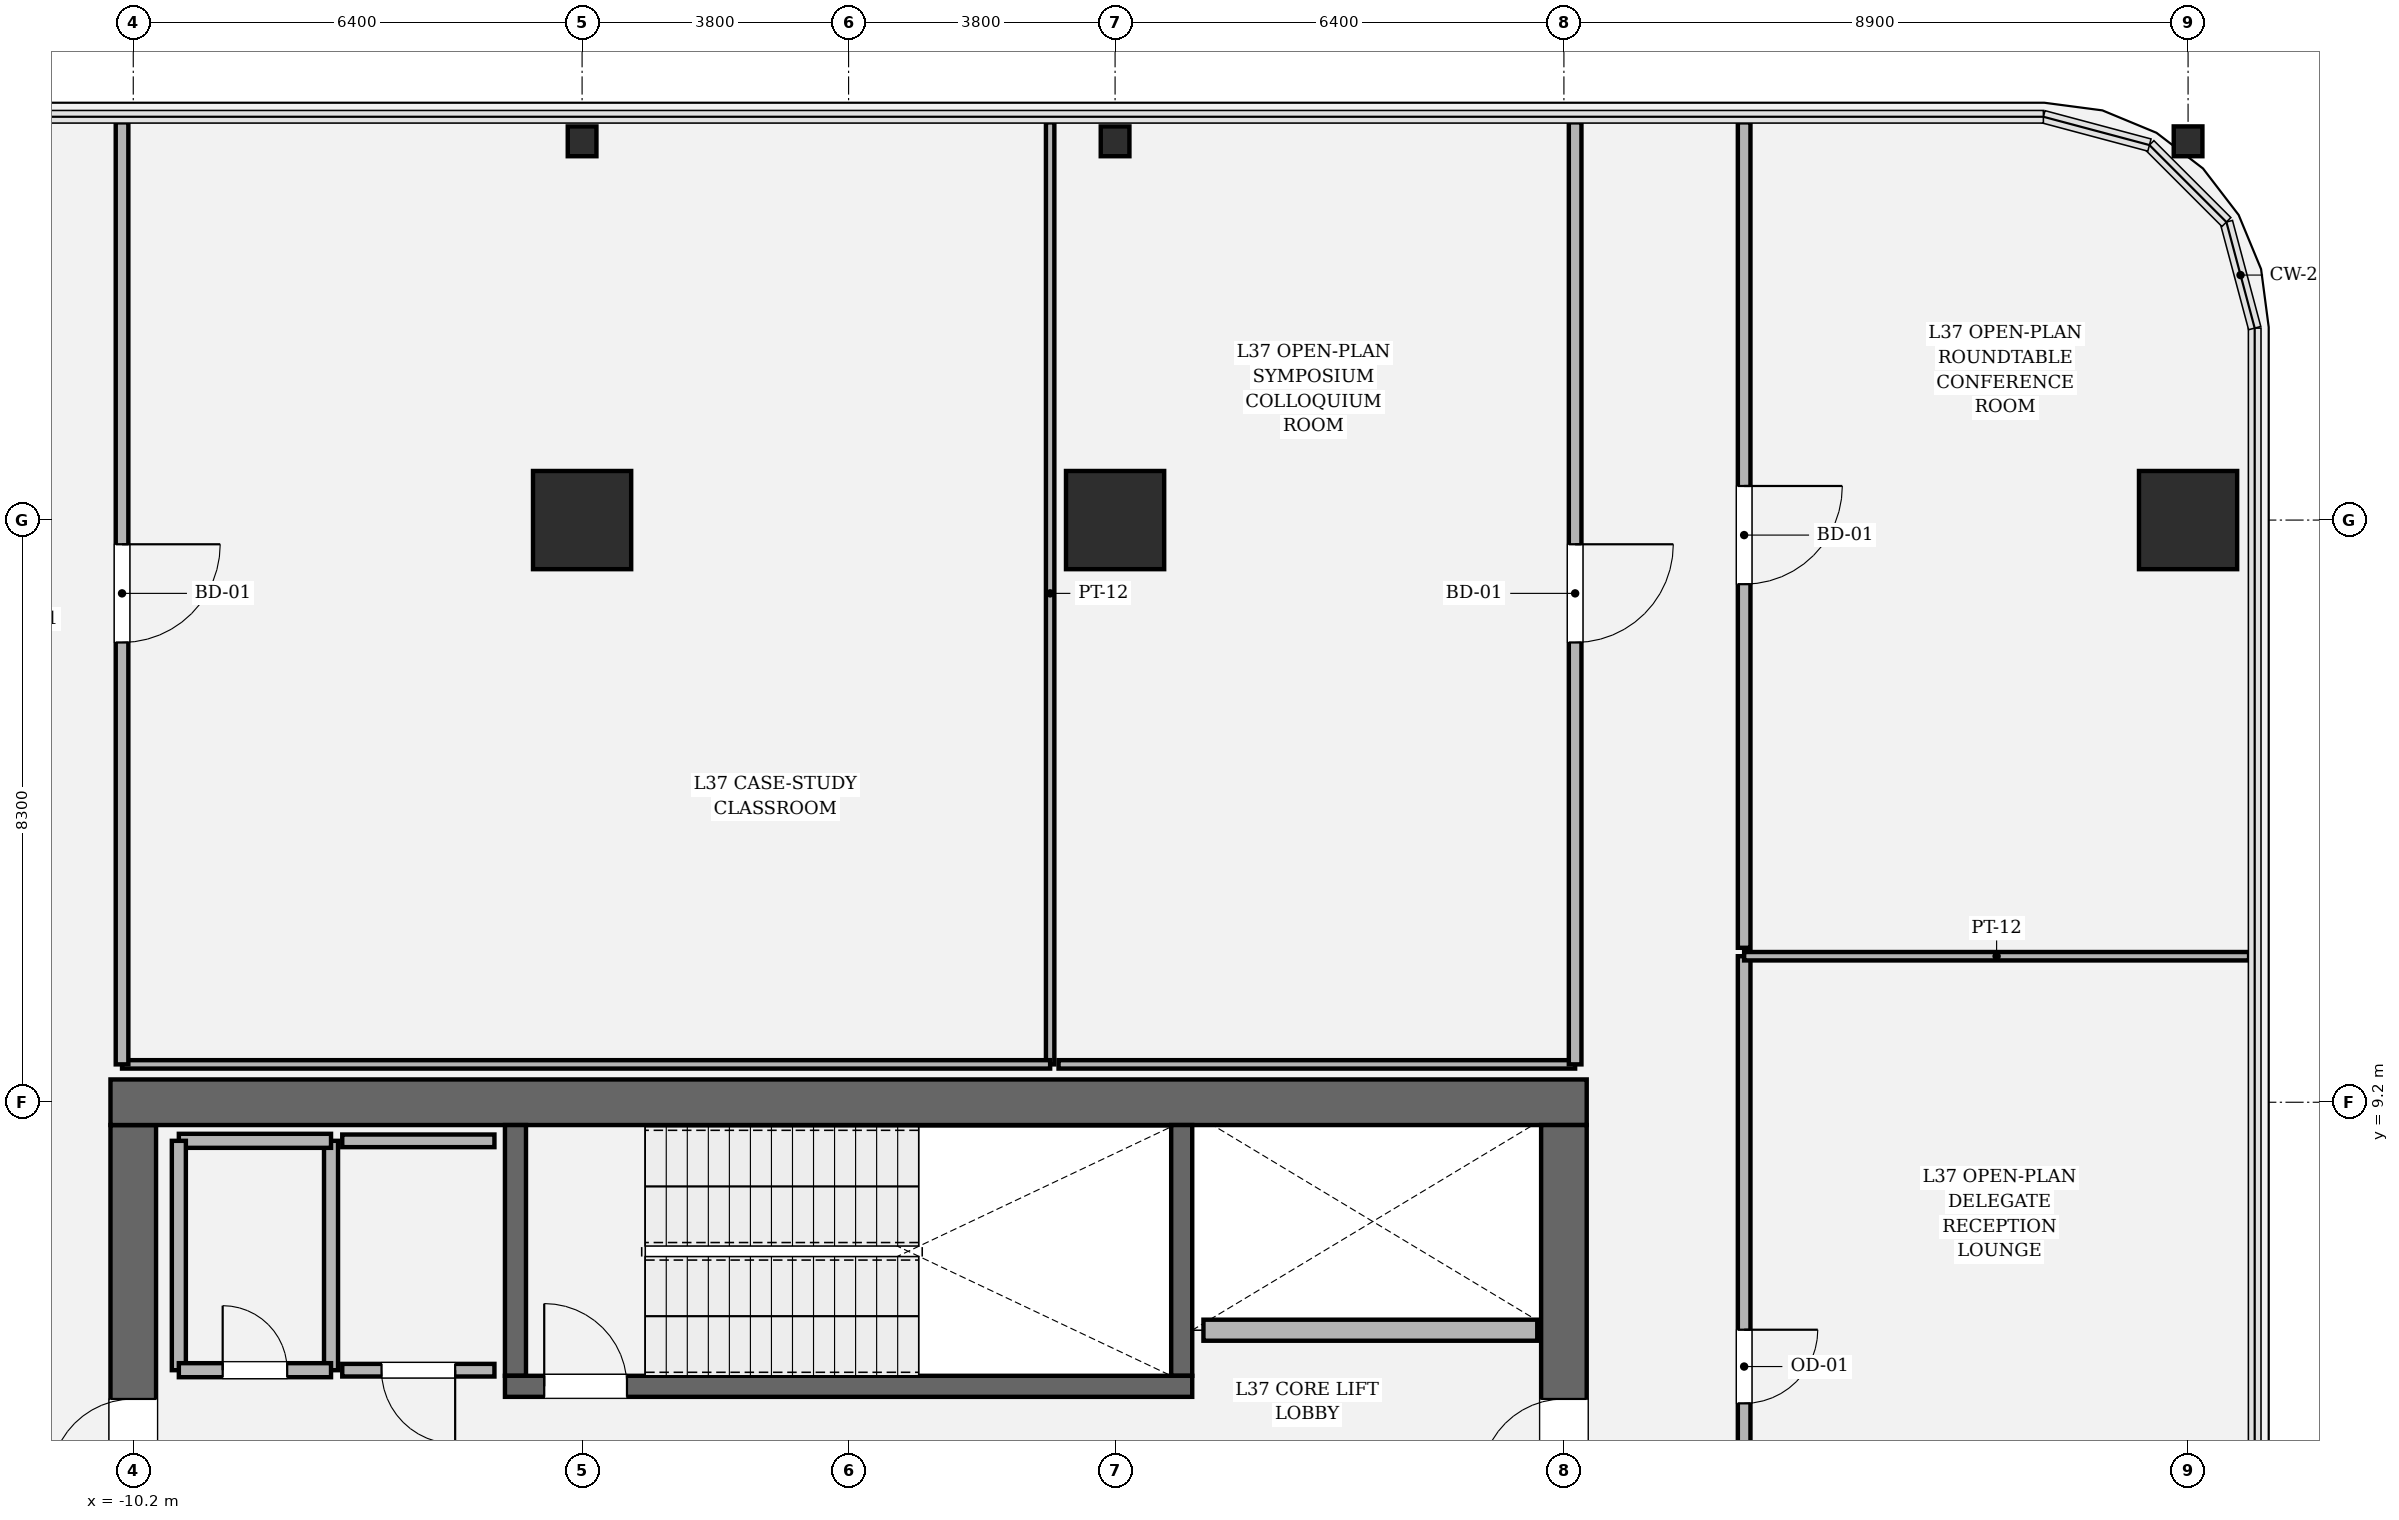
"""IFC4 building model, lengths in metres.
Left out: names, types, materials, properties, quantities, classifications, styles, units other than length and angle.
Written with IfcOpenShell. Run it as: python <this file> out.ifc"""

import sys

from ifc_helpers import new_model, si_unit, direction, frame, frame_2d, origin, origin_2d, place, context, subcontext, project, spatial, rectangle, hollow_rectangle, i_section, extrude, element, fill, save


model = new_model("IFC4")
c1 = context("Model", 3, precision=1e-05, world=origin(), true_north=direction((0.0, 1.0)))
c2 = subcontext(c1, "Body", "Model", "MODEL_VIEW")
j1 = project(units=[si_unit("LENGTHUNIT", "METRE"), si_unit("PLANEANGLEUNIT", "RADIAN")], contexts=[c1])
p1 = place(None, origin())
s1 = spatial("IfcSite", under=j1, at=p1, CompositionType="ELEMENT")
p2 = place(p1, origin())
s2 = spatial("IfcBuilding", under=s1, at=p2, CompositionType="ELEMENT")
p3 = place(p2, frame((0.0, 0.0, 160.05)))
s3 = spatial("IfcBuildingStorey", under=s2, at=p3, CompositionType="ELEMENT", Elevation=160.05)
p4 = place(p3, frame((-10.2, -8.875, 0.0), z_axis=(0.0, 0.0, 1.0), x_axis=(0.0, 1.0, 0.0)))
e1 = element("IfcWall", 1, at=p4, inside=s3, PredefinedType="SHEAR", context=c2, shape_type="SweptSolid", body=[
    extrude(rectangle(XDim=17.75, YDim=0.65, at=frame_2d((8.875, 0.0))), origin(), (0.0, 0.0, 1.0), 4.05),
])
p5 = place(p4, frame((12.665, 0.0, 0.0)))
e2 = element("IfcOpeningElement", 2, at=p5, cuts=e1, PredefinedType="OPENING", context=c2, shape_type="SweptSolid", body=[
    extrude(rectangle(XDim=1.18, YDim=2.2, at=frame_2d((0.59, 1.1))), frame((0.0, 0.335, 0.0), z_axis=(0.0, -1.0, 0.0), x_axis=(1.0, 0.0, 0.0)), (0.0, 0.0, 1.0), 0.67),
])
p6 = place(p3, frame((-10.525, 9.2, 0.0), z_axis=(0.0, 0.0, 1.0), x_axis=(1.0, 0.0, 0.0)))
e3 = element("IfcWall", 3, at=p6, inside=s3, PredefinedType="SHEAR", context=c2, shape_type="SweptSolid", body=[
    extrude(rectangle(XDim=21.05, YDim=0.65, at=frame_2d((10.525, 0.0))), origin(), (0.0, 0.0, 1.0), 4.05),
])
p7 = place(p3, frame((10.2, 8.875, 0.0), z_axis=(0.0, 0.0, 1.0), x_axis=(0.0, -1.0, 0.0)))
e4 = element("IfcWall", 4, at=p7, inside=s3, PredefinedType="SHEAR", context=c2, shape_type="SweptSolid", body=[
    extrude(rectangle(XDim=17.75, YDim=0.65, at=frame_2d((8.875, 0.0))), origin(), (0.0, 0.0, 1.0), 4.05),
])
p8 = place(p7, frame((3.905, 0.0, 0.0)))
e5 = element("IfcOpeningElement", 5, at=p8, cuts=e4, PredefinedType="OPENING", context=c2, shape_type="SweptSolid", body=[
    extrude(rectangle(XDim=1.18, YDim=2.2, at=frame_2d((0.59, 1.1))), frame((0.0, 0.335, 0.0), z_axis=(0.0, -1.0, 0.0), x_axis=(1.0, 0.0, 0.0)), (0.0, 0.0, 1.0), 0.67),
])
for number, where, z_axis, x_axis in (
    (6, (-4.75, 5.3, 0.0), (0.0, 0.0, 1.0), (0.0, 1.0, 0.0)),
    (7, (4.75, 8.875, 0.0), (0.0, 0.0, 1.0), (0.0, -1.0, 0.0)),
):
    element("IfcWall", number, at=place(p3, frame(where, z_axis=z_axis, x_axis=x_axis)), inside=s3, PredefinedType="SOLIDWALL", context=c2, shape_type="SweptSolid", body=[
        extrude(rectangle(XDim=3.575, YDim=0.3, at=frame_2d((1.788, 0.0))), origin(), (0.0, 0.0, 1.0), 4.05),
    ])
p9 = place(p3, frame((-4.9, 5.15, 0.0), z_axis=(0.0, 0.0, 1.0), x_axis=(1.0, 0.0, 0.0)))
e8 = element("IfcWall", 8, at=p9, inside=s3, PredefinedType="SOLIDWALL", context=c2, shape_type="SweptSolid", body=[
    extrude(rectangle(XDim=9.8, YDim=0.3, at=frame_2d((4.9, 0.0))), origin(), (0.0, 0.0, 1.0), 4.05),
])
p10 = place(p9, frame((0.56, 0.0, 0.0)))
e9 = element("IfcOpeningElement", 9, at=p10, cuts=e8, PredefinedType="OPENING", context=c2, shape_type="SweptSolid", body=[
    extrude(rectangle(XDim=1.18, YDim=2.2, at=frame_2d((0.59, 1.1))), frame((0.0, 0.16, 0.0), z_axis=(0.0, -1.0, 0.0), x_axis=(1.0, 0.0, 0.0)), (0.0, 0.0, 1.0), 0.32),
])
for number, where, z_axis, x_axis in (
    (10, (19.1, 17.5, 0.0), (0.0, 0.0, 1.0), (1.0, 0.0, 0.0)),
    (11, (3.8, 17.5, 0.0), (0.0, 0.0, 1.0), (1.0, 0.0, 0.0)),
    (12, (-3.8, 17.5, 0.0), (0.0, 0.0, 1.0), (1.0, 0.0, 0.0)),
):
    element("IfcColumn", number, at=place(p3, frame(where, z_axis=z_axis, x_axis=x_axis)), inside=s3, PredefinedType="COLUMN", context=c2, shape_type="SweptSolid", body=[
        extrude(hollow_rectangle(XDim=1.4, YDim=1.4, WallThickness=0.042, at=origin_2d()), origin(), (0.0, 0.0, 1.0), 4.05),
    ])
for number, where, z_axis, x_axis in (
    (13, (-3.8, 22.9, 0.0), (0.0, 0.0, 1.0), (1.0, 0.0, 0.0)),
    (14, (3.8, 22.9, 0.0), (0.0, 0.0, 1.0), (1.0, 0.0, 0.0)),
    (15, (19.1, 22.9, 0.0), (0.0, 0.0, 1.0), (1.0, 0.0, 0.0)),
):
    element("IfcColumn", number, at=place(p3, frame(where, z_axis=z_axis, x_axis=x_axis)), inside=s3, PredefinedType="COLUMN", context=c2, shape_type="SweptSolid", body=[
        extrude(i_section(OverallWidth=0.409, OverallDepth=0.425, WebThickness=0.032, FlangeThickness=0.052, FilletRadius=0.018, at=origin_2d()), origin(), (0.0, 0.0, 1.0), 4.048),
    ])
p11 = place(p3, frame((5.06, 5.95, 0.0), z_axis=(0.0, 0.0, 1.0), x_axis=(1.0, 0.0, 0.0)))
e16 = element("IfcWall", 16, at=p11, inside=s3, PredefinedType="SOLIDWALL", context=c2, shape_type="SweptSolid", body=[
    extrude(rectangle(XDim=4.76, YDim=0.3, at=frame_2d((2.38, 0.0))), origin(), (0.0, 0.0, 1.0), 3.83),
])
p12 = place(p3, frame((-7.38, 5.38, 0.0), z_axis=(0.0, 0.0, 1.0), x_axis=(0.0, 1.0, 0.0)))
e17 = element("IfcWall", 17, at=p12, inside=s3, PredefinedType="SOLIDWALL", context=c2, shape_type="SweptSolid", body=[
    extrude(rectangle(XDim=3.27, YDim=0.2, at=frame_2d((1.635, 0.0))), origin(), (0.0, 0.0, 1.0), 3.83),
])
p13 = place(p3, frame((-7.38, 8.65, 0.0), z_axis=(0.0, 0.0, 1.0), x_axis=(-1.0, 0.0, 0.0)))
e18 = element("IfcWall", 18, at=p13, inside=s3, PredefinedType="SOLIDWALL", context=c2, shape_type="SweptSolid", body=[
    extrude(rectangle(XDim=2.17, YDim=0.2, at=frame_2d((1.085, 0.0))), origin(), (0.0, 0.0, 1.0), 3.83),
])
p14 = place(p3, frame((-9.55, 8.65, 0.0), z_axis=(0.0, 0.0, 1.0), x_axis=(0.0, -1.0, 0.0)))
e19 = element("IfcWall", 19, at=p14, inside=s3, PredefinedType="SOLIDWALL", context=c2, shape_type="SweptSolid", body=[
    extrude(rectangle(XDim=3.27, YDim=0.2, at=frame_2d((1.635, 0.0))), origin(), (0.0, 0.0, 1.0), 3.83),
])
p15 = place(p3, frame((-9.55, 5.38, 0.0), z_axis=(0.0, 0.0, 1.0), x_axis=(1.0, 0.0, 0.0)))
e20 = element("IfcWall", 20, at=p15, inside=s3, PredefinedType="SOLIDWALL", context=c2, shape_type="SweptSolid", body=[
    extrude(rectangle(XDim=2.17, YDim=0.2, at=frame_2d((1.085, 0.0))), origin(), (0.0, 0.0, 1.0), 3.83),
])
p16 = place(p15, frame((0.625, 0.0, 0.0)))
e21 = element("IfcOpeningElement", 21, at=p16, cuts=e20, PredefinedType="OPENING", context=c2, shape_type="SweptSolid", body=[
    extrude(rectangle(XDim=0.92, YDim=2.1, at=frame_2d((0.46, 1.05))), frame((0.0, 0.11, 0.0), z_axis=(0.0, -1.0, 0.0), x_axis=(1.0, 0.0, 0.0)), (0.0, 0.0, 1.0), 0.22),
])
p17 = place(p3, frame((-5.05, 8.65, 0.0), z_axis=(0.0, 0.0, 1.0), x_axis=(-1.0, 0.0, 0.0)))
e22 = element("IfcWall", 22, at=p17, inside=s3, PredefinedType="PARTITIONING", context=c2, shape_type="SweptSolid", body=[
    extrude(rectangle(XDim=2.17, YDim=0.18, at=frame_2d((1.085, 0.0))), origin(), (0.0, 0.0, 1.0), 3.83),
])
p18 = place(p3, frame((-7.22, 5.38, 0.0), z_axis=(0.0, 0.0, 1.0), x_axis=(1.0, 0.0, 0.0)))
e23 = element("IfcWall", 23, at=p18, inside=s3, PredefinedType="PARTITIONING", context=c2, shape_type="SweptSolid", body=[
    extrude(rectangle(XDim=2.17, YDim=0.18, at=frame_2d((1.085, 0.0))), origin(), (0.0, 0.0, 1.0), 3.83),
])
p19 = place(p18, frame((0.56, 0.0, 0.0)))
e24 = element("IfcOpeningElement", 24, at=p19, cuts=e23, PredefinedType="OPENING", context=c2, shape_type="SweptSolid", body=[
    extrude(rectangle(XDim=1.05, YDim=2.2, at=frame_2d((0.525, 1.1))), frame((0.0, 0.1, 0.0), z_axis=(0.0, -1.0, 0.0), x_axis=(1.0, 0.0, 0.0)), (0.0, 0.0, 1.0), 0.2),
])
p20 = place(p3, frame((12.77, -0.418, 0.0), z_axis=(0.0, 0.0, 1.0), x_axis=(0.0, 1.0, 0.0)))
e25 = element("IfcWall", 25, at=p20, inside=s3, PredefinedType="PARTITIONING", context=c2, shape_type="SweptSolid", body=[
    extrude(rectangle(XDim=11.7, YDim=0.18, at=frame_2d((5.85, 0.0))), origin(), (0.0, 0.0, 1.0), 3.174),
])
p21 = place(p20, frame((5.325, 0.0, 0.0)))
e26 = element("IfcOpeningElement", 26, at=p21, cuts=e25, PredefinedType="OPENING", context=c2, shape_type="SweptSolid", body=[
    extrude(rectangle(XDim=1.05, YDim=2.2, at=frame_2d((0.525, 1.1))), frame((0.0, 0.1, 0.0), z_axis=(0.0, -1.0, 0.0), x_axis=(1.0, 0.0, 0.0)), (0.0, 0.0, 1.0), 0.2),
])
p22 = place(p3, frame((12.77, 11.282, 0.0), z_axis=(0.0, 0.0, 1.0), x_axis=(1.0, 0.0, 0.0)))
e27 = element("IfcWall", 27, at=p22, inside=s3, PredefinedType="PARTITIONING", context=c2, shape_type="SweptSolid", body=[
    extrude(rectangle(XDim=7.2, YDim=0.12, at=frame_2d((3.6, 0.0))), origin(), (0.0, 0.0, 1.0), 3.174),
])
p23 = place(p3, frame((2.874, 23.17, 0.0), z_axis=(0.0, 0.0, 1.0), x_axis=(0.0, -1.0, 0.0)))
e28 = element("IfcWall", 28, at=p23, inside=s3, PredefinedType="PARTITIONING", context=c2, shape_type="SweptSolid", body=[
    extrude(rectangle(XDim=13.43, YDim=0.12, at=frame_2d((6.715, 0.0))), origin(), (0.0, 0.0, 1.0), 2.544),
])
p24 = place(p3, frame((2.874, 9.74, 0.0), z_axis=(0.0, 0.0, 1.0), x_axis=(-1.0, 0.0, 0.0)))
e29 = element("IfcWall", 29, at=p24, inside=s3, PredefinedType="PARTITIONING", context=c2, shape_type="SweptSolid", body=[
    extrude(rectangle(XDim=13.234, YDim=0.12, at=frame_2d((6.617, 0.0))), origin(), (0.0, 0.0, 1.0), 3.174),
])
p25 = place(p3, frame((-10.36, 9.74, 0.0), z_axis=(0.0, 0.0, 1.0), x_axis=(0.0, 1.0, 0.0)))
e30 = element("IfcWall", 30, at=p25, inside=s3, PredefinedType="PARTITIONING", context=c2, shape_type="SweptSolid", body=[
    extrude(rectangle(XDim=13.43, YDim=0.18, at=frame_2d((6.715, 0.0))), origin(), (0.0, 0.0, 1.0), 2.544),
])
p26 = place(p25, frame((6.015, 0.0, 0.0)))
e31 = element("IfcOpeningElement", 31, at=p26, cuts=e30, PredefinedType="OPENING", context=c2, shape_type="SweptSolid", body=[
    extrude(rectangle(XDim=1.4, YDim=2.25, at=frame_2d((0.7, 1.125))), frame((0.0, 0.1, 0.0), z_axis=(0.0, -1.0, 0.0), x_axis=(1.0, 0.0, 0.0)), (0.0, 0.0, 1.0), 0.2),
])
p27 = place(p3, frame((10.36, 9.74, 0.0), z_axis=(0.0, 0.0, 1.0), x_axis=(-1.0, 0.0, 0.0)))
e32 = element("IfcWall", 32, at=p27, inside=s3, PredefinedType="PARTITIONING", context=c2, shape_type="SweptSolid", body=[
    extrude(rectangle(XDim=7.366, YDim=0.12, at=frame_2d((3.683, 0.0))), origin(), (0.0, 0.0, 1.0), 3.174),
])
p28 = place(p3, frame((10.36, 23.17, 0.0), z_axis=(0.0, 0.0, 1.0), x_axis=(0.0, -1.0, 0.0)))
e33 = element("IfcWall", 33, at=p28, inside=s3, PredefinedType="PARTITIONING", context=c2, shape_type="SweptSolid", body=[
    extrude(rectangle(XDim=13.43, YDim=0.18, at=frame_2d((6.715, 0.0))), origin(), (0.0, 0.0, 1.0), 2.544),
])
p29 = place(p28, frame((6.015, 0.0, 0.0)))
e34 = element("IfcOpeningElement", 34, at=p29, cuts=e33, PredefinedType="OPENING", context=c2, shape_type="SweptSolid", body=[
    extrude(rectangle(XDim=1.4, YDim=2.25, at=frame_2d((0.7, 1.125))), frame((0.0, 0.1, 0.0), z_axis=(0.0, -1.0, 0.0), x_axis=(1.0, 0.0, 0.0)), (0.0, 0.0, 1.0), 0.2),
])
p30 = place(p3, frame((12.77, 11.402, 0.0), z_axis=(0.0, 0.0, 1.0), x_axis=(0.0, 1.0, 0.0)))
e35 = element("IfcWall", 35, at=p30, inside=s3, PredefinedType="PARTITIONING", context=c2, shape_type="SweptSolid", body=[
    extrude(rectangle(XDim=11.768, YDim=0.18, at=frame_2d((5.884, 0.0))), origin(), (0.0, 0.0, 1.0), 2.544),
])
p31 = place(p30, frame((5.184, 0.0, 0.0)))
e36 = element("IfcOpeningElement", 36, at=p31, cuts=e35, PredefinedType="OPENING", context=c2, shape_type="SweptSolid", body=[
    extrude(rectangle(XDim=1.4, YDim=2.25, at=frame_2d((0.7, 1.125))), frame((0.0, 0.1, 0.0), z_axis=(0.0, -1.0, 0.0), x_axis=(1.0, 0.0, 0.0)), (0.0, 0.0, 1.0), 0.2),
])
p32 = place(p10, origin())
e37 = element("IfcDoor", 37, at=p32, inside=s3, OperationType="SINGLE_SWING_LEFT", PredefinedType="DOOR", context=c2, shape_type="SweptSolid", body=[
    extrude(rectangle(XDim=1.18, YDim=2.2, at=frame_2d((0.59, 1.1))), frame((0.0, 0.025, 0.0), z_axis=(0.0, -1.0, 0.0), x_axis=(1.0, 0.0, 0.0)), (0.0, 0.0, 1.0), 0.05),
])
fill(e9, e37)
p33 = place(p5, origin())
e38 = element("IfcDoor", 38, at=p33, inside=s3, OperationType="SINGLE_SWING_LEFT", PredefinedType="DOOR", context=c2, shape_type="SweptSolid", body=[
    extrude(rectangle(XDim=1.18, YDim=2.2, at=frame_2d((0.59, 1.1))), frame((0.0, 0.025, 0.0), z_axis=(0.0, -1.0, 0.0), x_axis=(1.0, 0.0, 0.0)), (0.0, 0.0, 1.0), 0.05),
])
fill(e2, e38)
p34 = place(p8, origin())
e39 = element("IfcDoor", 39, at=p34, inside=s3, OperationType="SINGLE_SWING_RIGHT", PredefinedType="DOOR", context=c2, shape_type="SweptSolid", body=[
    extrude(rectangle(XDim=1.18, YDim=2.2, at=frame_2d((0.59, 1.1))), frame((0.0, 0.025, 0.0), z_axis=(0.0, -1.0, 0.0), x_axis=(1.0, 0.0, 0.0)), (0.0, 0.0, 1.0), 0.05),
])
fill(e5, e39)
p35 = place(p16, origin())
e40 = element("IfcDoor", 40, at=p35, inside=s3, OperationType="SINGLE_SWING_LEFT", PredefinedType="DOOR", context=c2, shape_type="SweptSolid", body=[
    extrude(rectangle(XDim=0.92, YDim=2.1, at=frame_2d((0.46, 1.05))), frame((0.0, 0.025, 0.0), z_axis=(0.0, -1.0, 0.0), x_axis=(1.0, 0.0, 0.0)), (0.0, 0.0, 1.0), 0.05),
])
fill(e21, e40)
p36 = place(p19, origin())
e41 = element("IfcDoor", 41, at=p36, inside=s3, OperationType="SINGLE_SWING_RIGHT", PredefinedType="DOOR", context=c2, shape_type="SweptSolid", body=[
    extrude(rectangle(XDim=1.05, YDim=2.2, at=frame_2d((0.525, 1.1))), frame((0.0, 0.025, 0.0), z_axis=(0.0, -1.0, 0.0), x_axis=(1.0, 0.0, 0.0)), (0.0, 0.0, 1.0), 0.05),
])
fill(e24, e41)
p37 = place(p21, origin())
e42 = element("IfcDoor", 42, at=p37, inside=s3, OperationType="SINGLE_SWING_RIGHT", PredefinedType="DOOR", context=c2, shape_type="SweptSolid", body=[
    extrude(rectangle(XDim=1.05, YDim=2.2, at=frame_2d((0.525, 1.1))), frame((0.0, 0.025, 0.0), z_axis=(0.0, -1.0, 0.0), x_axis=(1.0, 0.0, 0.0)), (0.0, 0.0, 1.0), 0.05),
])
fill(e26, e42)
p38 = place(p26, origin())
e43 = element("IfcDoor", 43, at=p38, inside=s3, OperationType="SINGLE_SWING_RIGHT", PredefinedType="DOOR", context=c2, shape_type="SweptSolid", body=[
    extrude(rectangle(XDim=1.4, YDim=2.25, at=frame_2d((0.7, 1.125))), frame((0.0, 0.025, 0.0), z_axis=(0.0, -1.0, 0.0), x_axis=(1.0, 0.0, 0.0)), (0.0, 0.0, 1.0), 0.05),
])
fill(e31, e43)
p39 = place(p29, origin())
e44 = element("IfcDoor", 44, at=p39, inside=s3, OperationType="SINGLE_SWING_LEFT", PredefinedType="DOOR", context=c2, shape_type="SweptSolid", body=[
    extrude(rectangle(XDim=1.4, YDim=2.25, at=frame_2d((0.7, 1.125))), frame((0.0, 0.025, 0.0), z_axis=(0.0, -1.0, 0.0), x_axis=(1.0, 0.0, 0.0)), (0.0, 0.0, 1.0), 0.05),
])
fill(e34, e44)
p40 = place(p31, origin())
e45 = element("IfcDoor", 45, at=p40, inside=s3, OperationType="SINGLE_SWING_RIGHT", PredefinedType="DOOR", context=c2, shape_type="SweptSolid", body=[
    extrude(rectangle(XDim=1.4, YDim=2.25, at=frame_2d((0.7, 1.125))), frame((0.0, 0.025, 0.0), z_axis=(0.0, -1.0, 0.0), x_axis=(1.0, 0.0, 0.0)), (0.0, 0.0, 1.0), 0.05),
])
fill(e36, e45)
save(model, sys.argv[1])
